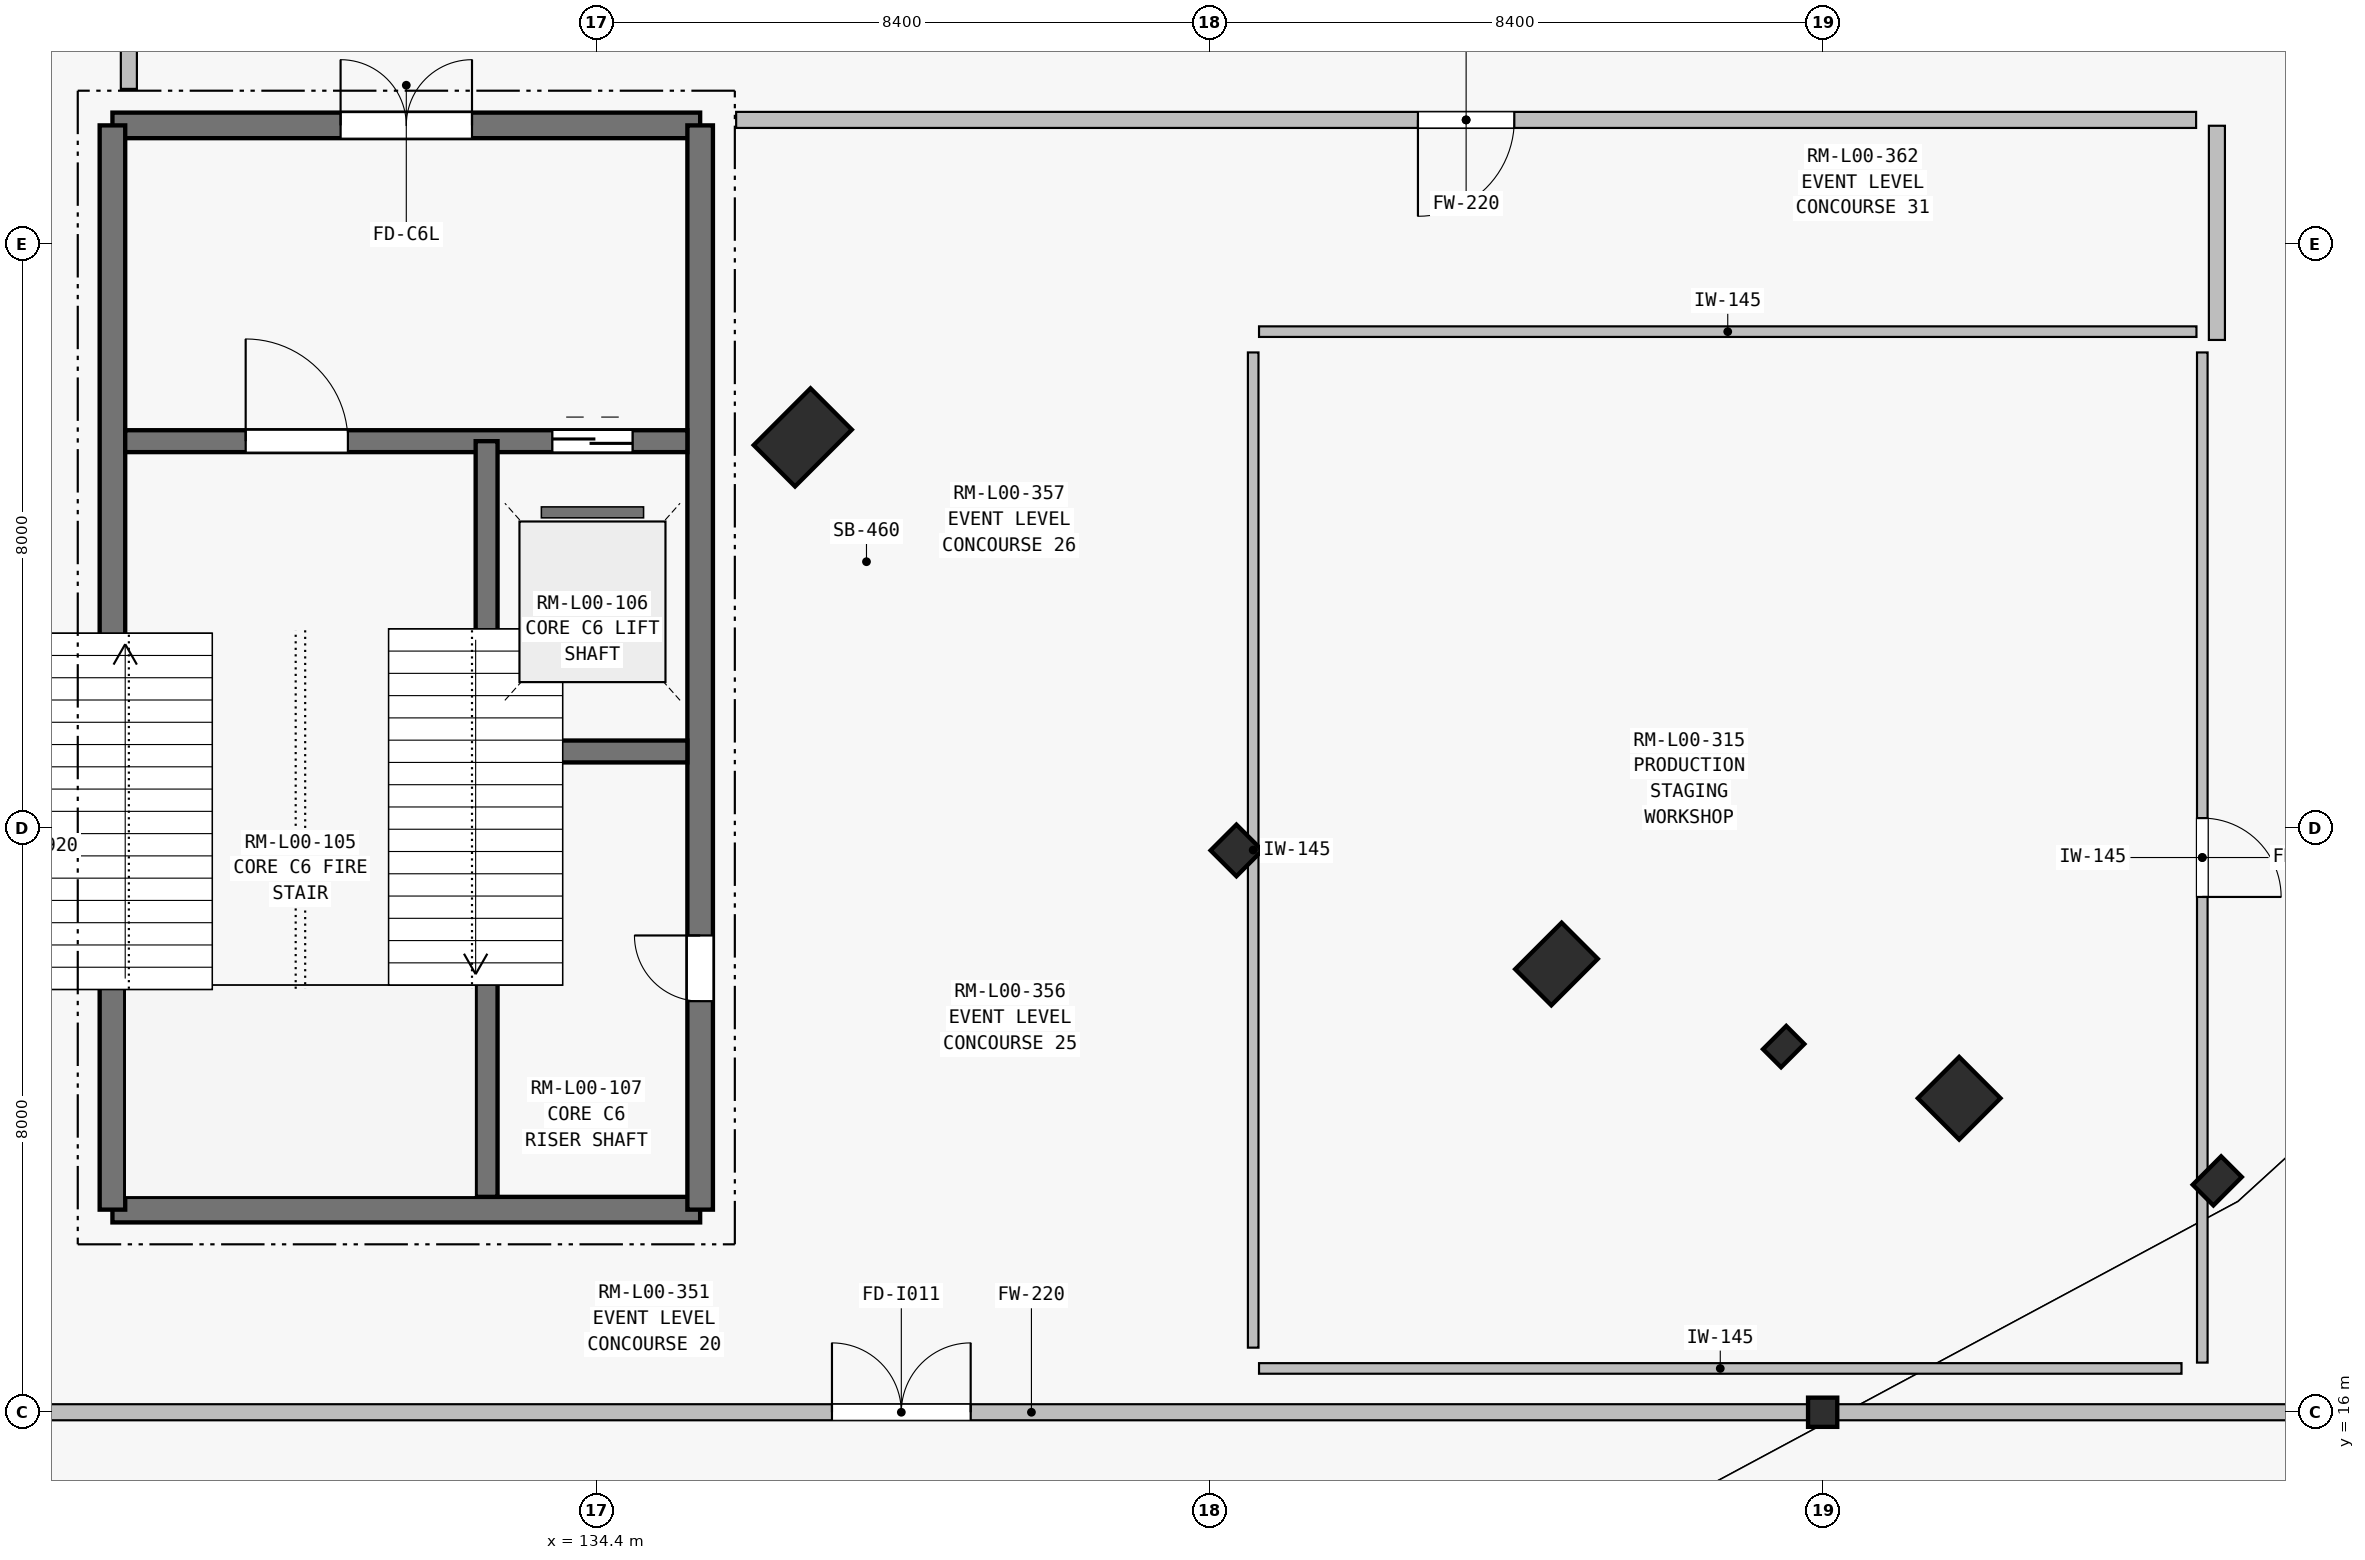
"""IFC4 building model, lengths in metres.
Left out: names, types, materials, properties, quantities, classifications, styles, units other than length and angle.
Written with IfcOpenShell. Run it as: python <this file> out.ifc"""

import sys

from ifc_helpers import new_model, si_unit, direction, frame, frame_2d, origin, origin_2d, place, context, subcontext, project, spatial, rectangle, i_section, extrude, element, fill, save


model = new_model("IFC4")
c1 = context("Model", 3, precision=1e-05, world=origin(), true_north=direction((0.0, 1.0)))
c2 = subcontext(c1, "Body", "Model", "MODEL_VIEW")
j1 = project(units=[si_unit("LENGTHUNIT", "METRE"), si_unit("PLANEANGLEUNIT", "RADIAN")], contexts=[c1])
p1 = place(None, origin())
s1 = spatial("IfcSite", under=j1, at=p1, CompositionType="ELEMENT")
p2 = place(p1, origin())
s2 = spatial("IfcBuilding", under=s1, at=p2, CompositionType="ELEMENT")
p3 = place(p2, origin())
s3 = spatial("IfcBuildingStorey", under=s2, at=p3, CompositionType="ELEMENT", Elevation=0.0)
p4 = place(p3, frame((137.231, 29.352, 0.0), z_axis=(0.0, 0.0, 1.0), x_axis=(0.707106781187, -0.707106781187, 0.0)))
e1 = element("IfcColumn", 1, at=p4, inside=s3, PredefinedType="COLUMN", context=c2, shape_type="SweptSolid", body=[
    extrude(rectangle(XDim=0.8, YDim=1.1, at=origin_2d()), origin(), (0.0, 0.0, 1.0), 5.4),
])
p5 = place(p3, frame((143.17, 23.695, 0.0), z_axis=(0.0, 0.0, 1.0), x_axis=(0.707106781187, -0.707106781187, 0.0)))
e2 = element("IfcColumn", 2, at=p5, inside=s3, PredefinedType="COLUMN", context=c2, shape_type="SweptSolid", body=[
    extrude(i_section(OverallWidth=0.5, OverallDepth=0.5, WebThickness=0.02, FlangeThickness=0.035, at=origin_2d()), origin(), (0.0, 0.0, 1.0), 5.4),
])
p6 = place(p3, frame((147.554, 22.139, 0.0), z_axis=(0.0, 0.0, 1.0), x_axis=(0.707106781187, -0.707106781187, 0.0)))
e3 = element("IfcColumn", 3, at=p6, inside=s3, PredefinedType="COLUMN", context=c2, shape_type="SweptSolid", body=[
    extrude(rectangle(XDim=0.7, YDim=0.9, at=origin_2d()), origin(), (0.0, 0.0, 1.0), 5.4),
])
p7 = place(p3, frame((153.07, 20.301, 0.0), z_axis=(0.0, 0.0, 1.0), x_axis=(0.707106781187, -0.707106781187, 0.0)))
e4 = element("IfcColumn", 4, at=p7, inside=s3, PredefinedType="COLUMN", context=c2, shape_type="SweptSolid", body=[
    extrude(rectangle(XDim=0.8, YDim=0.8, at=origin_2d()), origin(), (0.0, 0.0, 1.0), 5.4),
])
p8 = place(p3, frame((151.2, 16.0, 0.0), z_axis=(0.0, 0.0, 1.0), x_axis=(1.0, 0.0, 0.0)))
e5 = element("IfcColumn", 5, at=p8, inside=s3, PredefinedType="COLUMN", context=c2, shape_type="SweptSolid", body=[
    extrude(i_section(OverallWidth=0.4, OverallDepth=0.4, WebThickness=0.018, FlangeThickness=0.032, at=origin_2d()), origin(), (0.0, 0.0, 1.0), 5.4),
])
p9 = place(p3, frame((156.605, 19.169, 0.0), z_axis=(0.0, 0.0, 1.0), x_axis=(0.707106781187, -0.707106781187, 0.0)))
e6 = element("IfcColumn", 6, at=p9, inside=s3, PredefinedType="PILASTER", context=c2, shape_type="SweptSolid", body=[
    extrude(rectangle(XDim=0.4, YDim=0.55, at=origin_2d()), origin(), (0.0, 0.0, 1.0), 6.35),
])
p10 = place(p3, frame((150.666, 21.008, 0.0), z_axis=(0.0, 0.0, 1.0), x_axis=(0.707106781187, -0.707106781187, 0.0)))
e7 = element("IfcColumn", 7, at=p10, inside=s3, PredefinedType="PILASTER", context=c2, shape_type="SweptSolid", body=[
    extrude(rectangle(XDim=0.35, YDim=0.45, at=origin_2d()), origin(), (0.0, 0.0, 1.0), 5.4),
])
p11 = place(p3, frame((127.775, 18.775, 0.0), z_axis=(0.0, 0.0, 1.0), x_axis=(1.0, 0.0, 0.0)))
e8 = element("IfcWall", 8, at=p11, inside=s3, PredefinedType="SHEAR", context=c2, shape_type="SweptSolid", body=[
    extrude(rectangle(XDim=8.05, YDim=0.35, at=frame_2d((4.025, 0.0))), origin(), (0.0, 0.0, 1.0), 5.4),
])
p12 = place(p3, frame((127.775, 33.625, 0.0), z_axis=(0.0, 0.0, 1.0), x_axis=(1.0, 0.0, 0.0)))
e9 = element("IfcWall", 9, at=p12, inside=s3, PredefinedType="SHEAR", context=c2, shape_type="SweptSolid", body=[
    extrude(rectangle(XDim=8.05, YDim=0.35, at=frame_2d((4.025, 0.0))), origin(), (0.0, 0.0, 1.0), 5.4),
])
p13 = place(p12, frame((3.125, 0.0, 0.0)))
e10 = element("IfcOpeningElement", 10, at=p13, cuts=e9, PredefinedType="OPENING", context=c2, shape_type="SweptSolid", body=[
    extrude(rectangle(XDim=1.8, YDim=2.25, at=frame_2d((0.9, 1.125))), frame((0.0, 0.185, 0.0), z_axis=(0.0, -1.0, 0.0), x_axis=(1.0, 0.0, 0.0)), (0.0, 0.0, 1.0), 0.37),
])
p14 = place(p3, frame((127.775, 18.775, 0.0), z_axis=(0.0, 0.0, 1.0), x_axis=(0.0, 1.0, 0.0)))
e11 = element("IfcWall", 11, at=p14, inside=s3, PredefinedType="SHEAR", context=c2, shape_type="SweptSolid", body=[
    extrude(rectangle(XDim=14.85, YDim=0.35, at=frame_2d((7.425, 0.0))), origin(), (0.0, 0.0, 1.0), 5.4),
])
p15 = place(p3, frame((135.825, 18.775, 0.0), z_axis=(0.0, 0.0, 1.0), x_axis=(0.0, 1.0, 0.0)))
e12 = element("IfcWall", 12, at=p15, inside=s3, PredefinedType="SHEAR", context=c2, shape_type="SweptSolid", body=[
    extrude(rectangle(XDim=14.85, YDim=0.35, at=frame_2d((7.425, 0.0))), origin(), (0.0, 0.0, 1.0), 5.4),
])
p16 = place(p15, frame((2.855, 0.0, 0.0)))
e13 = element("IfcOpeningElement", 13, at=p16, cuts=e12, PredefinedType="OPENING", context=c2, shape_type="SweptSolid", body=[
    extrude(rectangle(XDim=0.9, YDim=2.1, at=frame_2d((0.45, 1.05))), frame((0.0, 0.185, 0.0), z_axis=(0.0, -1.0, 0.0), x_axis=(1.0, 0.0, 0.0)), (0.0, 0.0, 1.0), 0.37),
])
p17 = place(p3, frame((127.95, 29.3, 0.0), z_axis=(0.0, 0.0, 1.0), x_axis=(1.0, 0.0, 0.0)))
e14 = element("IfcWall", 14, at=p17, inside=s3, PredefinedType="SHEAR", context=c2, shape_type="SweptSolid", body=[
    extrude(rectangle(XDim=7.7, YDim=0.3, at=frame_2d((3.85, 0.0))), origin(), (0.0, 0.0, 1.0), 5.4),
])
p18 = place(p17, frame((1.65, 0.0, 0.0)))
e15 = element("IfcOpeningElement", 15, at=p18, cuts=e14, PredefinedType="OPENING", context=c2, shape_type="SweptSolid", body=[
    extrude(rectangle(XDim=1.4, YDim=2.2, at=frame_2d((0.7, 1.1))), frame((0.0, 0.16, 0.0), z_axis=(0.0, -1.0, 0.0), x_axis=(1.0, 0.0, 0.0)), (0.0, 0.0, 1.0), 0.32),
])
p19 = place(p17, frame((5.85, 0.0, 0.0)))
e16 = element("IfcOpeningElement", 16, at=p19, cuts=e14, PredefinedType="OPENING", context=c2, shape_type="SweptSolid", body=[
    extrude(rectangle(XDim=1.1, YDim=2.2, at=frame_2d((0.55, 1.1))), frame((0.0, 0.16, 0.0), z_axis=(0.0, -1.0, 0.0), x_axis=(1.0, 0.0, 0.0)), (0.0, 0.0, 1.0), 0.32),
])
p20 = place(p3, frame((132.9, 18.95, 0.0), z_axis=(0.0, 0.0, 1.0), x_axis=(0.0, 1.0, 0.0)))
e17 = element("IfcWall", 17, at=p20, inside=s3, PredefinedType="SHEAR", context=c2, shape_type="SweptSolid", body=[
    extrude(rectangle(XDim=10.35, YDim=0.3, at=frame_2d((5.175, 0.0))), origin(), (0.0, 0.0, 1.0), 5.4),
])
p21 = place(p3, frame((133.05, 25.05, 0.0), z_axis=(0.0, 0.0, 1.0), x_axis=(1.0, 0.0, 0.0)))
e18 = element("IfcWall", 18, at=p21, inside=s3, PredefinedType="SHEAR", context=c2, shape_type="SweptSolid", body=[
    extrude(rectangle(XDim=2.6, YDim=0.3, at=frame_2d((1.3, 0.0))), origin(), (0.0, 0.0, 1.0), 5.4),
])
p22 = place(p3, frame((117.886, 16.0, 0.0), z_axis=(0.0, 0.0, 1.0), x_axis=(1.0, 0.0, 0.0)))
e19 = element("IfcWall", 19, at=p22, inside=s3, PredefinedType="SOLIDWALL", context=c2, shape_type="SweptSolid", body=[
    extrude(rectangle(XDim=41.389, YDim=0.22, at=frame_2d((20.695, 0.0))), origin(), (0.0, 0.0, 1.0), 4.355),
])
p23 = place(p22, frame((19.745, 0.0, 0.0)))
e20 = element("IfcOpeningElement", 20, at=p23, cuts=e19, PredefinedType="OPENING", context=c2, shape_type="SweptSolid", body=[
    extrude(rectangle(XDim=1.9, YDim=2.35, at=frame_2d((0.95, 1.175))), frame((0.0, 0.12, 0.0), z_axis=(0.0, -1.0, 0.0), x_axis=(1.0, 0.0, 0.0)), (0.0, 0.0, 1.0), 0.24),
])
p24 = place(p3, frame((143.48, 30.8, 0.0), z_axis=(0.0, 0.0, 1.0), x_axis=(1.0, 0.0, 0.0)))
e21 = element("IfcWall", 21, at=p24, inside=s3, PredefinedType="PARTITIONING", context=c2, shape_type="SweptSolid", body=[
    extrude(rectangle(XDim=12.84, YDim=0.145, at=frame_2d((6.42, 0.0))), origin(), (0.0, 0.0, 1.0), 4.295),
])
p25 = place(p3, frame((156.4, 30.515, 0.0), z_axis=(0.0, 0.0, 1.0), x_axis=(0.0, -1.0, 0.0)))
e22 = element("IfcWall", 22, at=p25, inside=s3, PredefinedType="PARTITIONING", context=c2, shape_type="SweptSolid", body=[
    extrude(rectangle(XDim=13.835, YDim=0.145, at=frame_2d((6.917, 0.0))), origin(), (0.0, 0.0, 1.0), 5.18),
])
p26 = place(p25, frame((6.378, 0.0, 0.0)))
e23 = element("IfcOpeningElement", 23, at=p26, cuts=e22, PredefinedType="OPENING", context=c2, shape_type="SweptSolid", body=[
    extrude(rectangle(XDim=1.08, YDim=2.15, at=frame_2d((0.54, 1.075))), frame((0.0, 0.083, 0.0), z_axis=(0.0, -1.0, 0.0), x_axis=(1.0, 0.0, 0.0)), (0.0, 0.0, 1.0), 0.165),
])
p27 = place(p3, frame((156.115, 16.6, 0.0), z_axis=(0.0, 0.0, 1.0), x_axis=(-1.0, 0.0, 0.0)))
e24 = element("IfcWall", 24, at=p27, inside=s3, PredefinedType="PARTITIONING", context=c2, shape_type="SweptSolid", body=[
    extrude(rectangle(XDim=12.635, YDim=0.145, at=frame_2d((6.318, 0.0))), origin(), (0.0, 0.0, 1.0), 5.18),
])
p28 = place(p3, frame((143.4, 16.885, 0.0), z_axis=(0.0, 0.0, 1.0), x_axis=(0.0, 1.0, 0.0)))
e25 = element("IfcWall", 25, at=p28, inside=s3, PredefinedType="PARTITIONING", context=c2, shape_type="SweptSolid", body=[
    extrude(rectangle(XDim=13.63, YDim=0.145, at=frame_2d((6.815, 0.0))), origin(), (0.0, 0.0, 1.0), 4.295),
])
p29 = place(p3, frame((156.6, 30.686, 0.0), z_axis=(0.0, 0.0, 1.0), x_axis=(0.0, 1.0, 0.0)))
e26 = element("IfcWall", 26, at=p29, inside=s3, PredefinedType="SOLIDWALL", context=c2, shape_type="SweptSolid", body=[
    extrude(rectangle(XDim=2.934, YDim=0.22, at=frame_2d((1.467, 0.0))), origin(), (0.0, 0.0, 1.0), 5.12),
])
p30 = place(p3, frame((156.315, 33.7, 0.0), z_axis=(0.0, 0.0, 1.0), x_axis=(-1.0, 0.0, 0.0)))
e27 = element("IfcWall", 27, at=p30, inside=s3, PredefinedType="SOLIDWALL", context=c2, shape_type="SweptSolid", body=[
    extrude(rectangle(XDim=19.997, YDim=0.22, at=frame_2d((9.999, 0.0))), origin(), (0.0, 0.0, 1.0), 4.295),
])
p31 = place(p30, frame((9.339, 0.0, 0.0)))
e28 = element("IfcOpeningElement", 28, at=p31, cuts=e27, PredefinedType="OPENING", context=c2, shape_type="SweptSolid", body=[
    extrude(rectangle(XDim=1.32, YDim=2.2, at=frame_2d((0.66, 1.1))), frame((0.0, 0.12, 0.0), z_axis=(0.0, -1.0, 0.0), x_axis=(1.0, 0.0, 0.0)), (0.0, 0.0, 1.0), 0.24),
])
p32 = place(p3, frame((128.0, 34.125, 0.0), z_axis=(0.0, 0.0, 1.0), x_axis=(0.0, 1.0, 0.0)))
e29 = element("IfcWall", 29, at=p32, inside=s3, PredefinedType="SOLIDWALL", context=c2, shape_type="SweptSolid", body=[
    extrude(rectangle(XDim=1.795, YDim=0.22, at=frame_2d((0.897, 0.0))), origin(), (0.0, 0.0, 1.0), 2.323),
])
p33 = place(p13, origin())
e30 = element("IfcDoor", 30, at=p33, inside=s3, OperationType="DOUBLE_DOOR_SINGLE_SWING", PredefinedType="DOOR", context=c2, shape_type="SweptSolid", body=[
    extrude(rectangle(XDim=1.8, YDim=2.25, at=frame_2d((0.9, 1.125))), frame((0.0, 0.025, 0.0), z_axis=(0.0, -1.0, 0.0), x_axis=(1.0, 0.0, 0.0)), (0.0, 0.0, 1.0), 0.05),
])
fill(e10, e30)
p34 = place(p18, origin())
e31 = element("IfcDoor", 31, at=p34, inside=s3, OperationType="SINGLE_SWING_LEFT", PredefinedType="DOOR", context=c2, shape_type="SweptSolid", body=[
    extrude(rectangle(XDim=1.4, YDim=2.2, at=frame_2d((0.7, 1.1))), frame((0.0, 0.025, 0.0), z_axis=(0.0, -1.0, 0.0), x_axis=(1.0, 0.0, 0.0)), (0.0, 0.0, 1.0), 0.05),
])
fill(e15, e31)
p35 = place(p16, origin())
e32 = element("IfcDoor", 32, at=p35, inside=s3, OperationType="SINGLE_SWING_RIGHT", PredefinedType="DOOR", context=c2, shape_type="SweptSolid", body=[
    extrude(rectangle(XDim=0.9, YDim=2.1, at=frame_2d((0.45, 1.05))), frame((0.0, 0.025, 0.0), z_axis=(0.0, -1.0, 0.0), x_axis=(1.0, 0.0, 0.0)), (0.0, 0.0, 1.0), 0.05),
])
fill(e13, e32)
p36 = place(p19, origin())
e33 = element("IfcDoor", 33, at=p36, inside=s3, OperationType="SLIDING_TO_LEFT", PredefinedType="DOOR", context=c2, shape_type="SweptSolid", body=[
    extrude(rectangle(XDim=1.1, YDim=2.2, at=frame_2d((0.55, 1.1))), frame((0.0, 0.025, 0.0), z_axis=(0.0, -1.0, 0.0), x_axis=(1.0, 0.0, 0.0)), (0.0, 0.0, 1.0), 0.05),
])
fill(e16, e33)
p37 = place(p23, origin())
e34 = element("IfcDoor", 34, at=p37, inside=s3, OperationType="DOUBLE_DOOR_SINGLE_SWING", PredefinedType="DOOR", context=c2, shape_type="SweptSolid", body=[
    extrude(rectangle(XDim=1.9, YDim=2.35, at=frame_2d((0.95, 1.175))), frame((0.0, 0.025, 0.0), z_axis=(0.0, -1.0, 0.0), x_axis=(1.0, 0.0, 0.0)), (0.0, 0.0, 1.0), 0.05),
])
fill(e20, e34)
p38 = place(p26, origin())
e35 = element("IfcDoor", 35, at=p38, inside=s3, OperationType="SINGLE_SWING_RIGHT", PredefinedType="DOOR", context=c2, shape_type="SweptSolid", body=[
    extrude(rectangle(XDim=1.08, YDim=2.15, at=frame_2d((0.54, 1.075))), frame((0.0, 0.025, 0.0), z_axis=(0.0, -1.0, 0.0), x_axis=(1.0, 0.0, 0.0)), (0.0, 0.0, 1.0), 0.05),
])
fill(e23, e35)
p39 = place(p31, origin())
e36 = element("IfcDoor", 36, at=p39, inside=s3, OperationType="SINGLE_SWING_RIGHT", PredefinedType="DOOR", context=c2, shape_type="SweptSolid", body=[
    extrude(rectangle(XDim=1.32, YDim=2.2, at=frame_2d((0.66, 1.1))), frame((0.0, 0.025, 0.0), z_axis=(0.0, -1.0, 0.0), x_axis=(1.0, 0.0, 0.0)), (0.0, 0.0, 1.0), 0.05),
])
fill(e28, e36)
save(model, sys.argv[1])
